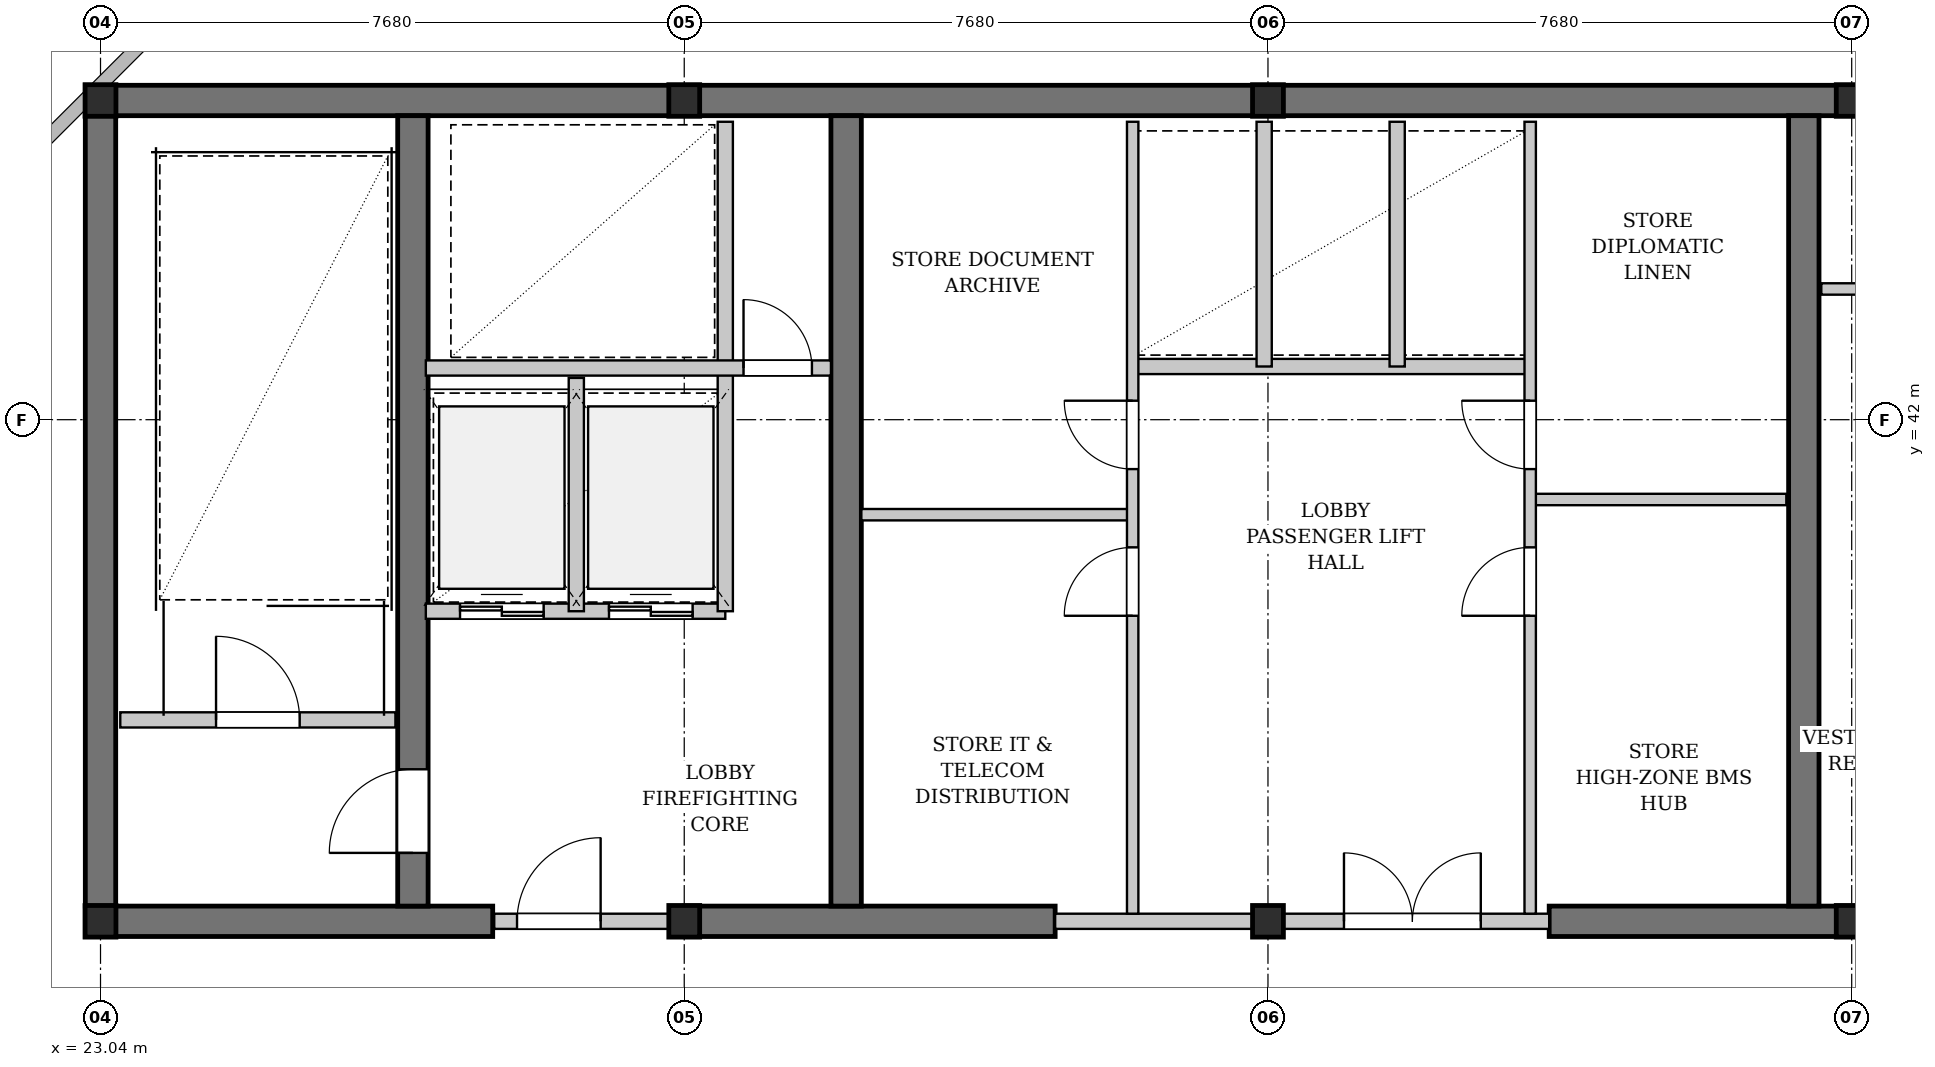
"""IFC4 building model, lengths in metres.
Left out: names, types, materials, properties, quantities, classifications, styles, units other than length and angle.
Written with IfcOpenShell. Run it as: python <this file> out.ifc"""

import sys

from ifc_helpers import new_model, si_unit, direction, frame, frame_2d, origin, origin_2d, place, context, subcontext, project, spatial, rectangle, i_section, extrude, element, fill, save


model = new_model("IFC4")
c1 = context("Model", 3, precision=1e-05, world=origin(), true_north=direction((0.0, 1.0)))
c2 = subcontext(c1, "Body", "Model", "MODEL_VIEW")
j1 = project(units=[si_unit("LENGTHUNIT", "METRE"), si_unit("PLANEANGLEUNIT", "RADIAN")], contexts=[c1])
p1 = place(None, origin())
s1 = spatial("IfcSite", under=j1, at=p1, CompositionType="ELEMENT")
p2 = place(p1, origin())
s2 = spatial("IfcBuilding", under=s1, at=p2, CompositionType="ELEMENT")
p3 = place(p2, frame((0.0, 0.0, 304.4)))
s3 = spatial("IfcBuildingStorey", under=s2, at=p3, CompositionType="ELEMENT", Elevation=304.4)
p4 = place(p3, frame((22.84, 46.2, 0.0), z_axis=(0.0, 0.0, 1.0), x_axis=(1.0, 0.0, 0.0)))
e1 = element("IfcWall", 1, at=p4, inside=s3, PredefinedType="SHEAR", context=c2, shape_type="SweptSolid", body=[
    extrude(rectangle(XDim=31.12, YDim=0.4, at=frame_2d((15.56, 0.0))), origin(), (0.0, 0.0, 1.0), 5.28),
])
p5 = place(p3, frame((22.84, 35.4, 0.0), z_axis=(0.0, 0.0, 1.0), x_axis=(1.0, 0.0, 0.0)))
e2 = element("IfcWall", 2, at=p5, inside=s3, PredefinedType="SHEAR", context=c2, shape_type="SweptSolid", body=[
    extrude(rectangle(XDim=5.36, YDim=0.4, at=frame_2d((2.68, 0.0))), origin(), (0.0, 0.0, 1.0), 5.28),
])
p6 = place(p3, frame((30.72, 35.4, 0.0), z_axis=(0.0, 0.0, 1.0), x_axis=(1.0, 0.0, 0.0)))
e3 = element("IfcWall", 3, at=p6, inside=s3, PredefinedType="SHEAR", context=c2, shape_type="SweptSolid", body=[
    extrude(rectangle(XDim=4.88, YDim=0.4, at=frame_2d((2.44, 0.0))), origin(), (0.0, 0.0, 1.0), 5.28),
])
p7 = place(p3, frame((42.1, 35.4, 0.0), z_axis=(0.0, 0.0, 1.0), x_axis=(1.0, 0.0, 0.0)))
e4 = element("IfcWall", 4, at=p7, inside=s3, PredefinedType="SHEAR", context=c2, shape_type="SweptSolid", body=[
    extrude(rectangle(XDim=8.05, YDim=0.4, at=frame_2d((4.025, 0.0))), origin(), (0.0, 0.0, 1.0), 5.28),
])
p8 = place(p7, frame((4.85, 0.0, 0.0)))
e5 = element("IfcOpeningElement", 5, at=p8, cuts=e4, PredefinedType="OPENING", context=c2, shape_type="SweptSolid", body=[
    extrude(rectangle(XDim=0.9, YDim=2.15, at=frame_2d((0.45, 1.075))), frame((0.0, 0.21, 0.0), z_axis=(0.0, -1.0, 0.0), x_axis=(1.0, 0.0, 0.0)), (0.0, 0.0, 1.0), 0.42),
])
p9 = place(p3, frame((23.04, 35.6, 0.0), z_axis=(0.0, 0.0, 1.0), x_axis=(0.0, 1.0, 0.0)))
e6 = element("IfcWall", 6, at=p9, inside=s3, PredefinedType="SHEAR", context=c2, shape_type="SweptSolid", body=[
    extrude(rectangle(XDim=10.4, YDim=0.4, at=frame_2d((5.2, 0.0))), origin(), (0.0, 0.0, 1.0), 5.28),
])
p10 = place(p3, frame((27.15, 35.6, 0.0), z_axis=(0.0, 0.0, 1.0), x_axis=(0.0, 1.0, 0.0)))
e7 = element("IfcWall", 7, at=p10, inside=s3, PredefinedType="SHEAR", context=c2, shape_type="SweptSolid", body=[
    extrude(rectangle(XDim=10.4, YDim=0.4, at=frame_2d((5.2, 0.0))), origin(), (0.0, 0.0, 1.0), 5.28),
])
p11 = place(p10, frame((0.7, 0.0, 0.0)))
e8 = element("IfcOpeningElement", 8, at=p11, cuts=e7, PredefinedType="OPENING", context=c2, shape_type="SweptSolid", body=[
    extrude(rectangle(XDim=1.1, YDim=2.15, at=frame_2d((0.55, 1.075))), frame((0.0, 0.21, 0.0), z_axis=(0.0, -1.0, 0.0), x_axis=(1.0, 0.0, 0.0)), (0.0, 0.0, 1.0), 0.42),
])
for number, where, z_axis, x_axis in (
    (9, (32.85, 35.6, 0.0), (0.0, 0.0, 1.0), (0.0, 1.0, 0.0)),
    (10, (45.45, 35.6, 0.0), (0.0, 0.0, 1.0), (0.0, 1.0, 0.0)),
):
    element("IfcWall", number, at=place(p3, frame(where, z_axis=z_axis, x_axis=x_axis)), inside=s3, PredefinedType="SHEAR", context=c2, shape_type="SweptSolid", body=[
        extrude(rectangle(XDim=10.4, YDim=0.4, at=frame_2d((5.2, 0.0))), origin(), (0.0, 0.0, 1.0), 5.28),
    ])
for number, where, z_axis, x_axis in (
    (11, (23.04, 35.4, 0.0), (0.0, 0.0, 1.0), (1.0, 0.0, 0.0)),
    (12, (23.04, 46.2, 0.0), (0.0, 0.0, 1.0), (1.0, 0.0, 0.0)),
    (13, (30.72, 35.4, 0.0), (0.0, 0.0, 1.0), (1.0, 0.0, 0.0)),
    (14, (30.72, 46.2, 0.0), (0.0, 0.0, 1.0), (1.0, 0.0, 0.0)),
    (15, (38.4, 35.4, 0.0), (0.0, 0.0, 1.0), (1.0, 0.0, 0.0)),
    (16, (38.4, 46.2, 0.0), (0.0, 0.0, 1.0), (1.0, 0.0, 0.0)),
    (17, (46.08, 35.4, 0.0), (0.0, 0.0, 1.0), (1.0, 0.0, 0.0)),
    (18, (46.08, 46.2, 0.0), (0.0, 0.0, 1.0), (1.0, 0.0, 0.0)),
):
    element("IfcColumn", number, at=place(p3, frame(where, z_axis=z_axis, x_axis=x_axis)), inside=s3, PredefinedType="COLUMN", context=c2, shape_type="SweptSolid", body=[
        extrude(i_section(OverallWidth=0.406, OverallDepth=0.416, WebThickness=0.03, FlangeThickness=0.048, FilletRadius=0.015, at=origin_2d()), origin(), (0.0, 0.0, 1.0), 5.6),
    ])
p12 = place(p3, frame((23.3, 38.05, 0.0), z_axis=(0.0, 0.0, 1.0), x_axis=(1.0, 0.0, 0.0)))
e19 = element("IfcWall", 19, at=p12, inside=s3, PredefinedType="PARTITIONING", context=c2, shape_type="SweptSolid", body=[
    extrude(rectangle(XDim=3.62, YDim=0.2, at=frame_2d((1.81, 0.0))), origin(), (0.0, 0.0, 1.0), 5.28),
])
p13 = place(p12, frame((1.26, 0.0, 0.0)))
e20 = element("IfcOpeningElement", 20, at=p13, cuts=e19, PredefinedType="OPENING", context=c2, shape_type="SweptSolid", body=[
    extrude(rectangle(XDim=1.1, YDim=2.15, at=frame_2d((0.55, 1.075))), frame((0.0, 0.11, 0.0), z_axis=(0.0, -1.0, 0.0), x_axis=(1.0, 0.0, 0.0)), (0.0, 0.0, 1.0), 0.22),
])
p14 = place(p3, frame((28.22, 35.4, 0.0), z_axis=(0.0, 0.0, 1.0), x_axis=(1.0, 0.0, 0.0)))
e21 = element("IfcWall", 21, at=p14, inside=s3, PredefinedType="PARTITIONING", context=c2, shape_type="SweptSolid", body=[
    extrude(rectangle(XDim=2.5, YDim=0.2, at=frame_2d((1.25, 0.0))), origin(), (0.0, 0.0, 1.0), 4.725),
])
p15 = place(p14, frame((0.3, 0.0, 0.0)))
e22 = element("IfcOpeningElement", 22, at=p15, cuts=e21, PredefinedType="OPENING", context=c2, shape_type="SweptSolid", body=[
    extrude(rectangle(XDim=1.1, YDim=2.15, at=frame_2d((0.55, 1.075))), frame((0.0, 0.11, 0.0), z_axis=(0.0, -1.0, 0.0), x_axis=(1.0, 0.0, 0.0)), (0.0, 0.0, 1.0), 0.22),
])
p16 = place(p3, frame((27.32, 39.48, 0.0), z_axis=(0.0, 0.0, 1.0), x_axis=(1.0, 0.0, 0.0)))
e23 = element("IfcWall", 23, at=p16, inside=s3, PredefinedType="PARTITIONING", context=c2, shape_type="SweptSolid", body=[
    extrude(rectangle(XDim=3.94, YDim=0.2, at=frame_2d((1.97, 0.0))), origin(), (0.0, 0.0, 1.0), 5.28),
])
p17 = place(p16, frame((0.45, 0.0, 0.0)))
e24 = element("IfcOpeningElement", 24, at=p17, cuts=e23, PredefinedType="OPENING", context=c2, shape_type="SweptSolid", body=[
    extrude(rectangle(XDim=1.1, YDim=2.2, at=frame_2d((0.55, 1.1))), frame((0.0, 0.11, 0.0), z_axis=(0.0, -1.0, 0.0), x_axis=(1.0, 0.0, 0.0)), (0.0, 0.0, 1.0), 0.22),
])
p18 = place(p16, frame((2.41, 0.0, 0.0)))
e25 = element("IfcOpeningElement", 25, at=p18, cuts=e23, PredefinedType="OPENING", context=c2, shape_type="SweptSolid", body=[
    extrude(rectangle(XDim=1.1, YDim=2.2, at=frame_2d((0.55, 1.1))), frame((0.0, 0.11, 0.0), z_axis=(0.0, -1.0, 0.0), x_axis=(1.0, 0.0, 0.0)), (0.0, 0.0, 1.0), 0.22),
])
p19 = place(p3, frame((29.3, 39.48, 0.0), z_axis=(0.0, 0.0, 1.0), x_axis=(0.0, 1.0, 0.0)))
e26 = element("IfcWall", 26, at=p19, inside=s3, PredefinedType="PARTITIONING", context=c2, shape_type="SweptSolid", body=[
    extrude(rectangle(XDim=3.07, YDim=0.2, at=frame_2d((1.535, 0.0))), origin(), (0.0, 0.0, 1.0), 5.28),
])
p20 = place(p3, frame((31.26, 39.48, 0.0), z_axis=(0.0, 0.0, 1.0), x_axis=(0.0, 1.0, 0.0)))
e27 = element("IfcWall", 27, at=p20, inside=s3, PredefinedType="PARTITIONING", context=c2, shape_type="SweptSolid", body=[
    extrude(rectangle(XDim=6.44, YDim=0.2, at=frame_2d((3.22, 0.0))), origin(), (0.0, 0.0, 1.0), 5.28),
])
p21 = place(p3, frame((27.32, 42.68, 0.0), z_axis=(0.0, 0.0, 1.0), x_axis=(1.0, 0.0, 0.0)))
e28 = element("IfcWall", 28, at=p21, inside=s3, PredefinedType="PARTITIONING", context=c2, shape_type="SweptSolid", body=[
    extrude(rectangle(XDim=5.33, YDim=0.2, at=frame_2d((2.665, 0.0))), origin(), (0.0, 0.0, 1.0), 5.28),
])
p22 = place(p21, frame((4.18, 0.0, 0.0)))
e29 = element("IfcOpeningElement", 29, at=p22, cuts=e28, PredefinedType="OPENING", context=c2, shape_type="SweptSolid", body=[
    extrude(rectangle(XDim=0.9, YDim=2.15, at=frame_2d((0.45, 1.075))), frame((0.0, 0.11, 0.0), z_axis=(0.0, -1.0, 0.0), x_axis=(1.0, 0.0, 0.0)), (0.0, 0.0, 1.0), 0.22),
])
p23 = place(p3, frame((35.6, 35.4, 0.0), z_axis=(0.0, 0.0, 1.0), x_axis=(1.0, 0.0, 0.0)))
e30 = element("IfcWall", 30, at=p23, inside=s3, PredefinedType="PARTITIONING", context=c2, shape_type="SweptSolid", body=[
    extrude(rectangle(XDim=6.5, YDim=0.2, at=frame_2d((3.25, 0.0))), origin(), (0.0, 0.0, 1.0), 4.725),
])
p24 = place(p23, frame((3.8, 0.0, 0.0)))
e31 = element("IfcOpeningElement", 31, at=p24, cuts=e30, PredefinedType="OPENING", context=c2, shape_type="SweptSolid", body=[
    extrude(rectangle(XDim=1.8, YDim=2.3, at=frame_2d((0.9, 1.15))), frame((0.0, 0.11, 0.0), z_axis=(0.0, -1.0, 0.0), x_axis=(1.0, 0.0, 0.0)), (0.0, 0.0, 1.0), 0.22),
])
p25 = place(p3, frame((36.6, 42.7, 0.0), z_axis=(0.0, 0.0, 1.0), x_axis=(1.0, 0.0, 0.0)))
e32 = element("IfcWall", 32, at=p25, inside=s3, PredefinedType="PARTITIONING", context=c2, shape_type="SweptSolid", body=[
    extrude(rectangle(XDim=5.25, YDim=0.2, at=frame_2d((2.625, 0.0))), origin(), (0.0, 0.0, 1.0), 5.28),
])
p26 = place(p3, frame((38.35, 42.7, 0.0), z_axis=(0.0, 0.0, 1.0), x_axis=(0.0, 1.0, 0.0)))
e33 = element("IfcWall", 33, at=p26, inside=s3, PredefinedType="PARTITIONING", context=c2, shape_type="SweptSolid", body=[
    extrude(rectangle(XDim=3.22, YDim=0.2, at=frame_2d((1.61, 0.0))), origin(), (0.0, 0.0, 1.0), 4.725),
])
p27 = place(p3, frame((40.1, 42.7, 0.0), z_axis=(0.0, 0.0, 1.0), x_axis=(0.0, 1.0, 0.0)))
e34 = element("IfcWall", 34, at=p27, inside=s3, PredefinedType="PARTITIONING", context=c2, shape_type="SweptSolid", body=[
    extrude(rectangle(XDim=3.22, YDim=0.2, at=frame_2d((1.61, 0.0))), origin(), (0.0, 0.0, 1.0), 5.28),
])
p28 = place(p3, frame((33.05, 40.75, 0.0), z_axis=(0.0, 0.0, 1.0), x_axis=(1.0, 0.0, 0.0)))
e35 = element("IfcWall", 35, at=p28, inside=s3, PredefinedType="PARTITIONING", context=c2, shape_type="SweptSolid", body=[
    extrude(rectangle(XDim=3.57, YDim=0.15, at=frame_2d((1.785, 0.0))), origin(), (0.0, 0.0, 1.0), 5.28),
])
p29 = place(p3, frame((36.62, 35.5, 0.0), z_axis=(0.0, 0.0, 1.0), x_axis=(0.0, 1.0, 0.0)))
e36 = element("IfcWall", 36, at=p29, inside=s3, PredefinedType="PARTITIONING", context=c2, shape_type="SweptSolid", body=[
    extrude(rectangle(XDim=10.42, YDim=0.15, at=frame_2d((5.21, 0.0))), origin(), (0.0, 0.0, 1.0), 5.28),
])
p30 = place(p29, frame((3.92, 0.0, 0.0)))
e37 = element("IfcOpeningElement", 37, at=p30, cuts=e36, PredefinedType="OPENING", context=c2, shape_type="SweptSolid", body=[
    extrude(rectangle(XDim=0.9, YDim=2.15, at=frame_2d((0.45, 1.075))), frame((0.0, 0.085, 0.0), z_axis=(0.0, -1.0, 0.0), x_axis=(1.0, 0.0, 0.0)), (0.0, 0.0, 1.0), 0.17),
])
p31 = place(p29, frame((5.85, 0.0, 0.0)))
e38 = element("IfcOpeningElement", 38, at=p31, cuts=e36, PredefinedType="OPENING", context=c2, shape_type="SweptSolid", body=[
    extrude(rectangle(XDim=0.9, YDim=2.15, at=frame_2d((0.45, 1.075))), frame((0.0, 0.085, 0.0), z_axis=(0.0, -1.0, 0.0), x_axis=(1.0, 0.0, 0.0)), (0.0, 0.0, 1.0), 0.17),
])
p32 = place(p3, frame((41.85, 40.95, 0.0), z_axis=(0.0, 0.0, 1.0), x_axis=(1.0, 0.0, 0.0)))
e39 = element("IfcWall", 39, at=p32, inside=s3, PredefinedType="PARTITIONING", context=c2, shape_type="SweptSolid", body=[
    extrude(rectangle(XDim=3.37, YDim=0.15, at=frame_2d((1.685, 0.0))), origin(), (0.0, 0.0, 1.0), 5.28),
])
p33 = place(p3, frame((41.85, 35.5, 0.0), z_axis=(0.0, 0.0, 1.0), x_axis=(0.0, 1.0, 0.0)))
e40 = element("IfcWall", 40, at=p33, inside=s3, PredefinedType="PARTITIONING", context=c2, shape_type="SweptSolid", body=[
    extrude(rectangle(XDim=10.42, YDim=0.15, at=frame_2d((5.21, 0.0))), origin(), (0.0, 0.0, 1.0), 5.28),
])
p34 = place(p33, frame((3.92, 0.0, 0.0)))
e41 = element("IfcOpeningElement", 41, at=p34, cuts=e40, PredefinedType="OPENING", context=c2, shape_type="SweptSolid", body=[
    extrude(rectangle(XDim=0.9, YDim=2.15, at=frame_2d((0.45, 1.075))), frame((0.0, 0.085, 0.0), z_axis=(0.0, -1.0, 0.0), x_axis=(1.0, 0.0, 0.0)), (0.0, 0.0, 1.0), 0.17),
])
p35 = place(p33, frame((5.85, 0.0, 0.0)))
e42 = element("IfcOpeningElement", 42, at=p35, cuts=e40, PredefinedType="OPENING", context=c2, shape_type="SweptSolid", body=[
    extrude(rectangle(XDim=0.9, YDim=2.15, at=frame_2d((0.45, 1.075))), frame((0.0, 0.085, 0.0), z_axis=(0.0, -1.0, 0.0), x_axis=(1.0, 0.0, 0.0)), (0.0, 0.0, 1.0), 0.17),
])
p36 = place(p3, frame((45.68, 43.72, 0.0), z_axis=(0.0, 0.0, 1.0), x_axis=(1.0, 0.0, 0.0)))
e43 = element("IfcWall", 43, at=p36, inside=s3, PredefinedType="PARTITIONING", context=c2, shape_type="SweptSolid", body=[
    extrude(rectangle(XDim=4.5, YDim=0.15, at=frame_2d((2.25, 0.0))), origin(), (0.0, 0.0, 1.0), 5.28),
])
p37 = place(p36, frame((0.55, 0.0, 0.0)))
e44 = element("IfcOpeningElement", 44, at=p37, cuts=e43, PredefinedType="OPENING", context=c2, shape_type="SweptSolid", body=[
    extrude(rectangle(XDim=0.95, YDim=2.15, at=frame_2d((0.475, 1.075))), frame((0.0, 0.085, 0.0), z_axis=(0.0, -1.0, 0.0), x_axis=(1.0, 0.0, 0.0)), (0.0, 0.0, 1.0), 0.17),
])
p38 = place(p13, origin())
e45 = element("IfcDoor", 45, at=p38, inside=s3, OperationType="SINGLE_SWING_LEFT", PredefinedType="DOOR", context=c2, shape_type="SweptSolid", body=[
    extrude(rectangle(XDim=1.1, YDim=2.15, at=frame_2d((0.55, 1.075))), frame((0.0, 0.025, 0.0), z_axis=(0.0, -1.0, 0.0), x_axis=(1.0, 0.0, 0.0)), (0.0, 0.0, 1.0), 0.05),
])
fill(e20, e45)
p39 = place(p15, origin())
e46 = element("IfcDoor", 46, at=p39, inside=s3, OperationType="SINGLE_SWING_RIGHT", PredefinedType="DOOR", context=c2, shape_type="SweptSolid", body=[
    extrude(rectangle(XDim=1.1, YDim=2.15, at=frame_2d((0.55, 1.075))), frame((0.0, 0.025, 0.0), z_axis=(0.0, -1.0, 0.0), x_axis=(1.0, 0.0, 0.0)), (0.0, 0.0, 1.0), 0.05),
])
fill(e22, e46)
p40 = place(p17, origin())
e47 = element("IfcDoor", 47, at=p40, inside=s3, OperationType="DOUBLE_DOOR_SLIDING", PredefinedType="DOOR", context=c2, shape_type="SweptSolid", body=[
    extrude(rectangle(XDim=1.1, YDim=2.2, at=frame_2d((0.55, 1.1))), frame((0.0, 0.025, 0.0), z_axis=(0.0, -1.0, 0.0), x_axis=(1.0, 0.0, 0.0)), (0.0, 0.0, 1.0), 0.05),
])
fill(e24, e47)
p41 = place(p18, origin())
e48 = element("IfcDoor", 48, at=p41, inside=s3, OperationType="DOUBLE_DOOR_SLIDING", PredefinedType="DOOR", context=c2, shape_type="SweptSolid", body=[
    extrude(rectangle(XDim=1.1, YDim=2.2, at=frame_2d((0.55, 1.1))), frame((0.0, 0.025, 0.0), z_axis=(0.0, -1.0, 0.0), x_axis=(1.0, 0.0, 0.0)), (0.0, 0.0, 1.0), 0.05),
])
fill(e25, e48)
p42 = place(p22, origin())
e49 = element("IfcDoor", 49, at=p42, inside=s3, OperationType="SINGLE_SWING_LEFT", PredefinedType="DOOR", context=c2, shape_type="SweptSolid", body=[
    extrude(rectangle(XDim=0.9, YDim=2.15, at=frame_2d((0.45, 1.075))), frame((0.0, 0.025, 0.0), z_axis=(0.0, -1.0, 0.0), x_axis=(1.0, 0.0, 0.0)), (0.0, 0.0, 1.0), 0.05),
])
fill(e29, e49)
p43 = place(p24, origin())
e50 = element("IfcDoor", 50, at=p43, inside=s3, OperationType="DOUBLE_DOOR_SINGLE_SWING", PredefinedType="DOOR", context=c2, shape_type="SweptSolid", body=[
    extrude(rectangle(XDim=1.8, YDim=2.3, at=frame_2d((0.9, 1.15))), frame((0.0, 0.025, 0.0), z_axis=(0.0, -1.0, 0.0), x_axis=(1.0, 0.0, 0.0)), (0.0, 0.0, 1.0), 0.05),
])
fill(e31, e50)
p44 = place(p30, origin())
e51 = element("IfcDoor", 51, at=p44, inside=s3, OperationType="SINGLE_SWING_LEFT", PredefinedType="DOOR", context=c2, shape_type="SweptSolid", body=[
    extrude(rectangle(XDim=0.9, YDim=2.15, at=frame_2d((0.45, 1.075))), frame((0.0, 0.025, 0.0), z_axis=(0.0, -1.0, 0.0), x_axis=(1.0, 0.0, 0.0)), (0.0, 0.0, 1.0), 0.05),
])
fill(e37, e51)
p45 = place(p31, origin())
e52 = element("IfcDoor", 52, at=p45, inside=s3, OperationType="SINGLE_SWING_RIGHT", PredefinedType="DOOR", context=c2, shape_type="SweptSolid", body=[
    extrude(rectangle(XDim=0.9, YDim=2.15, at=frame_2d((0.45, 1.075))), frame((0.0, 0.025, 0.0), z_axis=(0.0, -1.0, 0.0), x_axis=(1.0, 0.0, 0.0)), (0.0, 0.0, 1.0), 0.05),
])
fill(e38, e52)
p46 = place(p34, origin())
e53 = element("IfcDoor", 53, at=p46, inside=s3, OperationType="SINGLE_SWING_LEFT", PredefinedType="DOOR", context=c2, shape_type="SweptSolid", body=[
    extrude(rectangle(XDim=0.9, YDim=2.15, at=frame_2d((0.45, 1.075))), frame((0.0, 0.025, 0.0), z_axis=(0.0, -1.0, 0.0), x_axis=(1.0, 0.0, 0.0)), (0.0, 0.0, 1.0), 0.05),
])
fill(e41, e53)
p47 = place(p35, origin())
e54 = element("IfcDoor", 54, at=p47, inside=s3, OperationType="SINGLE_SWING_RIGHT", PredefinedType="DOOR", context=c2, shape_type="SweptSolid", body=[
    extrude(rectangle(XDim=0.9, YDim=2.15, at=frame_2d((0.45, 1.075))), frame((0.0, 0.025, 0.0), z_axis=(0.0, -1.0, 0.0), x_axis=(1.0, 0.0, 0.0)), (0.0, 0.0, 1.0), 0.05),
])
fill(e42, e54)
p48 = place(p11, origin())
e55 = element("IfcDoor", 55, at=p48, inside=s3, OperationType="SINGLE_SWING_LEFT", PredefinedType="DOOR", context=c2, shape_type="SweptSolid", body=[
    extrude(rectangle(XDim=1.1, YDim=2.15, at=frame_2d((0.55, 1.075))), frame((0.0, 0.025, 0.0), z_axis=(0.0, -1.0, 0.0), x_axis=(1.0, 0.0, 0.0)), (0.0, 0.0, 1.0), 0.05),
])
fill(e8, e55)
save(model, sys.argv[1])
